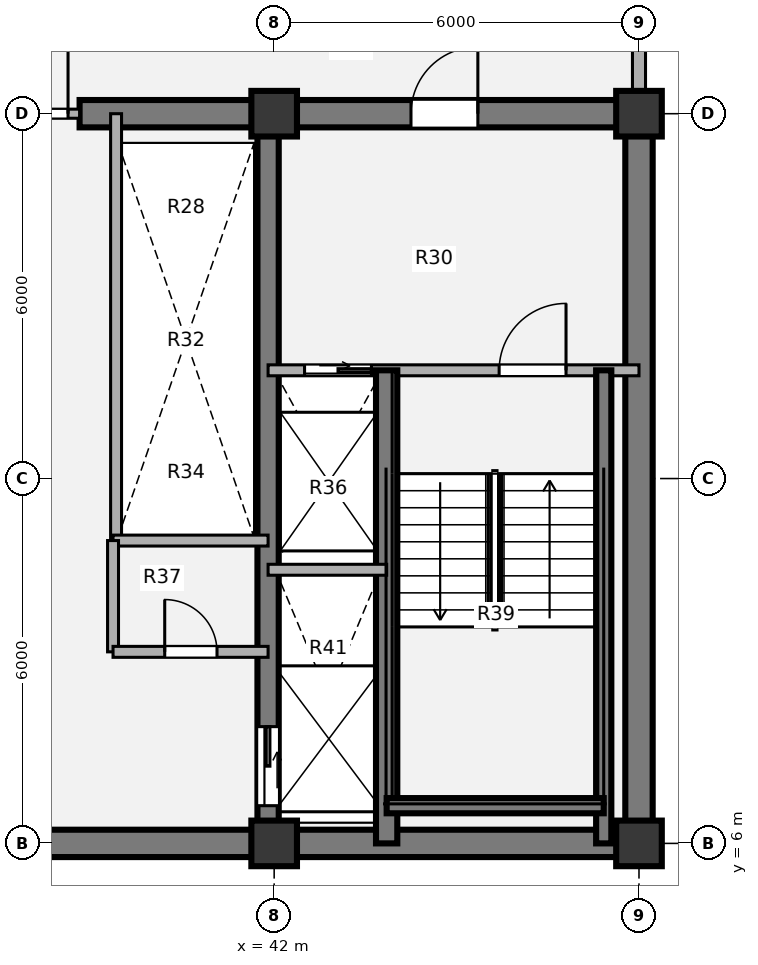
"""IFC4 building model, lengths in metres.
Left out: names, types, materials, properties, quantities, classifications, styles, units other than length and angle.
Written with IfcOpenShell. Run it as: python <this file> out.ifc"""

import sys

from ifc_helpers import new_model, si_unit, direction, frame, frame_2d, origin, origin_2d, place, context, subcontext, project, spatial, rectangle, extrude, source, transform, mapped, element, fill, save


model = new_model("IFC4")
c1 = context("Model", 3, precision=1e-05, world=origin(), true_north=direction((0.0, 1.0)))
c2 = subcontext(c1, "Body", "Model", "MODEL_VIEW")
j1 = project(units=[si_unit("LENGTHUNIT", "METRE"), si_unit("PLANEANGLEUNIT", "RADIAN")], contexts=[c1])
p1 = place(None, origin())
s1 = spatial("IfcSite", under=j1, at=p1, CompositionType="ELEMENT")
p2 = place(p1, origin())
s2 = spatial("IfcBuilding", under=s1, at=p2, CompositionType="ELEMENT")
p3 = place(p2, frame((0.0, 0.0, 171.54)))
s3 = spatial("IfcBuildingStorey", under=s2, at=p3, CompositionType="ELEMENT", Elevation=171.54)
m1 = source(origin(), c2, "Body", "SweptSolid", [
    extrude(rectangle(XDim=0.75, YDim=0.75, at=origin_2d()), origin(), (0.0, 0.0, 1.0), 3.78),
])
for number, where, z_axis, x_axis in (
    (1, (42.0, 6.0, 0.0), (0.0, 0.0, 1.0), (1.0, 0.0, 0.0)),
    (2, (48.0, 6.0, 0.0), (0.0, 0.0, 1.0), (1.0, 0.0, 0.0)),
    (3, (42.0, 18.0, 0.0), (0.0, 0.0, 1.0), (1.0, 0.0, 0.0)),
    (4, (48.0, 18.0, 0.0), (0.0, 0.0, 1.0), (1.0, 0.0, 0.0)),
):
    element("IfcColumn", number, at=place(p3, frame(where, z_axis=z_axis, x_axis=x_axis)), inside=s3, PredefinedType="COLUMN", context=c2, shape_type="MappedRepresentation", body=[
        mapped(m1, transform((0.0, 0.0, 0.0), x_axis=(1.0, 0.0, 0.0), y_axis=(0.0, 1.0, 0.0), z_axis=(0.0, 0.0, 1.0), scale=1.0)),
    ])
p4 = place(p3, frame((48.225, 6.0, 0.0), z_axis=(0.0, 0.0, 1.0), x_axis=(-1.0, 0.0, 0.0)))
e5 = element("IfcWall", 5, at=p4, inside=s3, PredefinedType="SHEAR", context=c2, shape_type="SweptSolid", body=[
    extrude(rectangle(XDim=24.45, YDim=0.45, at=frame_2d((12.225, 0.0))), origin(), (0.0, 0.0, 1.0), 3.78),
])
p5 = place(p3, frame((48.0, 18.0, 0.0), z_axis=(0.0, 0.0, 1.0), x_axis=(0.0, -1.0, 0.0)))
e6 = element("IfcWall", 6, at=p5, inside=s3, PredefinedType="SHEAR", context=c2, shape_type="SweptSolid", body=[
    extrude(rectangle(XDim=12.0, YDim=0.45, at=frame_2d((6.0, 0.0))), origin(), (0.0, 0.0, 1.0), 3.78),
])
p6 = place(p3, frame((38.8, 18.0, 0.0), z_axis=(0.0, 0.0, 1.0), x_axis=(1.0, 0.0, 0.0)))
e7 = element("IfcWall", 7, at=p6, inside=s3, PredefinedType="SHEAR", context=c2, shape_type="SweptSolid", body=[
    extrude(rectangle(XDim=9.425, YDim=0.45, at=frame_2d((4.712, 0.0))), origin(), (0.0, 0.0, 1.0), 3.78),
])
p7 = place(p6, frame((5.45, 0.0, 0.0)))
e8 = element("IfcOpeningElement", 8, at=p7, cuts=e7, PredefinedType="OPENING", context=c2, shape_type="SweptSolid", body=[
    extrude(rectangle(XDim=1.1, YDim=2.1, at=origin_2d()), frame((0.55, 0.235, 1.05), z_axis=(0.0, -1.0, 0.0), x_axis=(1.0, 0.0, 0.0)), (0.0, 0.0, 1.0), 0.47),
])
p8 = place(p3, frame((41.9, 18.0, 0.0), z_axis=(0.0, 0.0, 1.0), x_axis=(0.0, -1.0, 0.0)))
e9 = element("IfcWall", 9, at=p8, inside=s3, PredefinedType="SHEAR", context=c2, shape_type="SweptSolid", body=[
    extrude(rectangle(XDim=12.0, YDim=0.35, at=frame_2d((6.0, 0.0))), origin(), (0.0, 0.0, 1.0), 3.78),
])
p9 = place(p8, frame((10.08, 0.0, 0.0)))
e10 = element("IfcOpeningElement", 10, at=p9, cuts=e9, PredefinedType="OPENING", context=c2, shape_type="SweptSolid", body=[
    extrude(rectangle(XDim=1.3, YDim=2.1, at=origin_2d()), frame((0.65, 0.185, 1.05), z_axis=(0.0, -1.0, 0.0), x_axis=(1.0, 0.0, 0.0)), (0.0, 0.0, 1.0), 0.37),
])
p10 = place(p3, frame((48.0, 21.05, 0.0), z_axis=(0.0, 0.0, 1.0), x_axis=(0.0, -1.0, 0.0)))
e11 = element("IfcWall", 11, at=p10, inside=s3, PredefinedType="SOLIDWALL", context=c2, shape_type="SweptSolid", body=[
    extrude(rectangle(XDim=2.695, YDim=0.215, at=frame_2d((1.348, 0.0))), origin(), (0.0, 0.0, 1.0), 2.718),
])
p11 = place(p3, frame((39.4, 11.0, 0.0), z_axis=(0.0, 0.0, 1.0), x_axis=(0.0, 1.0, 0.0)))
e12 = element("IfcWall", 12, at=p11, inside=s3, PredefinedType="PARTITIONING", context=c2, shape_type="SweptSolid", body=[
    extrude(rectangle(XDim=7.0, YDim=0.18, at=frame_2d((3.5, 0.0))), origin(), (0.0, 0.0, 1.0), 3.5),
])
p12 = place(p3, frame((39.35, 10.98, 0.0), z_axis=(0.0, 0.0, 1.0), x_axis=(1.0, 0.0, 0.0)))
e13 = element("IfcWall", 13, at=p12, inside=s3, PredefinedType="PARTITIONING", context=c2, shape_type="SweptSolid", body=[
    extrude(rectangle(XDim=2.55, YDim=0.18, at=frame_2d((1.275, 0.0))), origin(), (0.0, 0.0, 1.0), 3.5),
])
p13 = place(p3, frame((39.35, 9.15, 0.0), z_axis=(0.0, 0.0, 1.0), x_axis=(0.0, 1.0, 0.0)))
e14 = element("IfcWall", 14, at=p13, inside=s3, PredefinedType="PARTITIONING", context=c2, shape_type="SweptSolid", body=[
    extrude(rectangle(XDim=1.83, YDim=0.18, at=frame_2d((0.915, 0.0))), origin(), (0.0, 0.0, 1.0), 3.5),
])
p14 = place(p3, frame((39.35, 9.15, 0.0), z_axis=(0.0, 0.0, 1.0), x_axis=(1.0, 0.0, 0.0)))
e15 = element("IfcWall", 15, at=p14, inside=s3, PredefinedType="PARTITIONING", context=c2, shape_type="SweptSolid", body=[
    extrude(rectangle(XDim=2.55, YDim=0.18, at=frame_2d((1.275, 0.0))), origin(), (0.0, 0.0, 1.0), 3.5),
])
p15 = place(p14, frame((0.85, 0.0, 0.0)))
e16 = element("IfcOpeningElement", 16, at=p15, cuts=e15, PredefinedType="OPENING", context=c2, shape_type="SweptSolid", body=[
    extrude(rectangle(XDim=0.86, YDim=2.1, at=origin_2d()), frame((0.43, 0.1, 1.05), z_axis=(0.0, -1.0, 0.0), x_axis=(1.0, 0.0, 0.0)), (0.0, 0.0, 1.0), 0.2),
])
p16 = place(p3, frame((33.2, 18.0, 0.0), z_axis=(0.0, 0.0, 1.0), x_axis=(1.0, 0.0, 0.0)))
e17 = element("IfcWall", 17, at=p16, inside=s3, PredefinedType="PARTITIONING", context=c2, shape_type="SweptSolid", body=[
    extrude(rectangle(XDim=5.6, YDim=0.15, at=frame_2d((2.8, 0.0))), origin(), (0.0, 0.0, 1.0), 2.515),
])
p17 = place(p16, frame((0.19, 0.0, 0.0)))
e18 = element("IfcOpeningElement", 18, at=p17, cuts=e17, PredefinedType="OPENING", context=c2, shape_type="SweptSolid", body=[
    extrude(rectangle(XDim=1.1, YDim=2.1, at=origin_2d()), frame((0.55, 0.085, 1.05), z_axis=(0.0, -1.0, 0.0), x_axis=(1.0, 0.0, 0.0)), (0.0, 0.0, 1.0), 0.17),
])
p18 = place(p16, frame((4.31, 0.0, 0.0)))
e19 = element("IfcOpeningElement", 19, at=p18, cuts=e17, PredefinedType="OPENING", context=c2, shape_type="SweptSolid", body=[
    extrude(rectangle(XDim=1.1, YDim=2.1, at=origin_2d()), frame((0.55, 0.085, 1.05), z_axis=(0.0, -1.0, 0.0), x_axis=(1.0, 0.0, 0.0)), (0.0, 0.0, 1.0), 0.17),
])
p19 = place(p3, frame((41.9, 13.78, 0.0), z_axis=(0.0, 0.0, 1.0), x_axis=(1.0, 0.0, 0.0)))
e20 = element("IfcWall", 20, at=p19, inside=s3, PredefinedType="PARTITIONING", context=c2, shape_type="SweptSolid", body=[
    extrude(rectangle(XDim=6.1, YDim=0.18, at=frame_2d((3.05, 0.0))), origin(), (0.0, 0.0, 1.0), 3.5),
])
p20 = place(p19, frame((0.6, 0.0, 0.0)))
e21 = element("IfcOpeningElement", 21, at=p20, cuts=e20, PredefinedType="OPENING", context=c2, shape_type="SweptSolid", body=[
    extrude(rectangle(XDim=1.1, YDim=2.1, at=origin_2d()), frame((0.55, 0.1, 1.05), z_axis=(0.0, -1.0, 0.0), x_axis=(1.0, 0.0, 0.0)), (0.0, 0.0, 1.0), 0.2),
])
p21 = place(p19, frame((3.8, 0.0, 0.0)))
e22 = element("IfcOpeningElement", 22, at=p21, cuts=e20, PredefinedType="OPENING", context=c2, shape_type="SweptSolid", body=[
    extrude(rectangle(XDim=1.1, YDim=2.1, at=origin_2d()), frame((0.55, 0.1, 1.05), z_axis=(0.0, -1.0, 0.0), x_axis=(1.0, 0.0, 0.0)), (0.0, 0.0, 1.0), 0.2),
])
p22 = place(p3, frame((43.85, 6.0, 0.0), z_axis=(0.0, 0.0, 1.0), x_axis=(0.0, 1.0, 0.0)))
e23 = element("IfcWall", 23, at=p22, inside=s3, PredefinedType="SHEAR", context=c2, shape_type="SweptSolid", body=[
    extrude(rectangle(XDim=7.78, YDim=0.35, at=frame_2d((3.89, 0.0))), origin(), (0.0, 0.0, 1.0), 3.85),
])
p23 = place(p3, frame((47.42, 6.0, 0.0), z_axis=(0.0, 0.0, 1.0), x_axis=(0.0, 1.0, 0.0)))
e24 = element("IfcWall", 24, at=p23, inside=s3, PredefinedType="SHEAR", context=c2, shape_type="SweptSolid", body=[
    extrude(rectangle(XDim=7.78, YDim=0.25, at=frame_2d((3.89, 0.0))), origin(), (0.0, 0.0, 1.0), 3.85),
])
p24 = place(p3, frame((43.85, 6.62, 0.0), z_axis=(0.0, 0.0, 1.0), x_axis=(1.0, 0.0, 0.0)))
e25 = element("IfcWall", 25, at=p24, inside=s3, PredefinedType="SHEAR", context=c2, shape_type="SweptSolid", body=[
    extrude(rectangle(XDim=3.57, YDim=0.25, at=frame_2d((1.785, 0.0))), origin(), (0.0, 0.0, 1.0), 3.85),
])
p25 = place(p3, frame((41.9, 10.5, 0.0), z_axis=(0.0, 0.0, 1.0), x_axis=(1.0, 0.0, 0.0)))
e26 = element("IfcWall", 26, at=p25, inside=s3, PredefinedType="PARTITIONING", context=c2, shape_type="SweptSolid", body=[
    extrude(rectangle(XDim=1.95, YDim=0.18, at=frame_2d((0.975, 0.0))), origin(), (0.0, 0.0, 1.0), 3.5),
])
m2 = source(origin(), c2, "Body", "SweptSolid", [
    extrude(rectangle(XDim=0.86, YDim=2.1, at=origin_2d()), frame((0.43, 0.025, 1.05), z_axis=(0.0, -1.0, 0.0), x_axis=(1.0, 0.0, 0.0)), (0.0, 0.0, 1.0), 0.05),
])
p26 = place(p15, origin())
e27 = element("IfcDoor", 27, at=p26, inside=s3, OperationType="SINGLE_SWING_LEFT", PredefinedType="DOOR", context=c2, shape_type="MappedRepresentation", body=[
    mapped(m2, transform((0.0, 0.0, 0.0), x_axis=(1.0, 0.0, 0.0), y_axis=(0.0, 1.0, 0.0), z_axis=(0.0, 0.0, 1.0), scale=1.0)),
])
fill(e16, e27)
m3 = source(origin(), c2, "Body", "SweptSolid", [
    extrude(rectangle(XDim=1.1, YDim=2.1, at=origin_2d()), frame((0.55, 0.025, 1.05), z_axis=(0.0, -1.0, 0.0), x_axis=(1.0, 0.0, 0.0)), (0.0, 0.0, 1.0), 0.05),
])
p27 = place(p18, origin())
e28 = element("IfcDoor", 28, at=p27, inside=s3, OperationType="SINGLE_SWING_RIGHT", PredefinedType="DOOR", context=c2, shape_type="MappedRepresentation", body=[
    mapped(m3, transform((0.0, 0.0, 0.0), x_axis=(1.0, 0.0, 0.0), y_axis=(0.0, 1.0, 0.0), z_axis=(0.0, 0.0, 1.0), scale=1.0)),
])
fill(e19, e28)
m4 = source(origin(), c2, "Body", "SweptSolid", [
    extrude(rectangle(XDim=1.1, YDim=2.1, at=origin_2d()), frame((0.55, 0.025, 1.05), z_axis=(0.0, -1.0, 0.0), x_axis=(1.0, 0.0, 0.0)), (0.0, 0.0, 1.0), 0.05),
])
p28 = place(p20, origin())
e29 = element("IfcDoor", 29, at=p28, inside=s3, OperationType="SLIDING_TO_RIGHT", PredefinedType="DOOR", context=c2, shape_type="MappedRepresentation", body=[
    mapped(m4, transform((0.0, 0.0, 0.0), x_axis=(1.0, 0.0, 0.0), y_axis=(0.0, 1.0, 0.0), z_axis=(0.0, 0.0, 1.0), scale=1.0)),
])
fill(e21, e29)
m5 = source(origin(), c2, "Body", "SweptSolid", [
    extrude(rectangle(XDim=1.1, YDim=2.1, at=origin_2d()), frame((0.55, 0.025, 1.05), z_axis=(0.0, -1.0, 0.0), x_axis=(1.0, 0.0, 0.0)), (0.0, 0.0, 1.0), 0.05),
])
p29 = place(p21, origin())
e30 = element("IfcDoor", 30, at=p29, inside=s3, OperationType="SINGLE_SWING_RIGHT", PredefinedType="DOOR", context=c2, shape_type="MappedRepresentation", body=[
    mapped(m5, transform((0.0, 0.0, 0.0), x_axis=(1.0, 0.0, 0.0), y_axis=(0.0, 1.0, 0.0), z_axis=(0.0, 0.0, 1.0), scale=1.0)),
])
fill(e22, e30)
m6 = source(origin(), c2, "Body", "SweptSolid", [
    extrude(rectangle(XDim=1.3, YDim=2.1, at=origin_2d()), frame((0.65, 0.025, 1.05), z_axis=(0.0, -1.0, 0.0), x_axis=(1.0, 0.0, 0.0)), (0.0, 0.0, 1.0), 0.05),
])
p30 = place(p9, origin())
e31 = element("IfcDoor", 31, at=p30, inside=s3, OperationType="SLIDING_TO_LEFT", PredefinedType="DOOR", context=c2, shape_type="MappedRepresentation", body=[
    mapped(m6, transform((0.0, 0.0, 0.0), x_axis=(1.0, 0.0, 0.0), y_axis=(0.0, 1.0, 0.0), z_axis=(0.0, 0.0, 1.0), scale=1.0)),
])
fill(e10, e31)
p31 = place(p7, origin())
e32 = element("IfcDoor", 32, at=p31, inside=s3, OperationType="SINGLE_SWING_RIGHT", PredefinedType="DOOR", context=c2, shape_type="MappedRepresentation", body=[
    mapped(m3, transform((0.0, 0.0, 0.0), x_axis=(1.0, 0.0, 0.0), y_axis=(0.0, 1.0, 0.0), z_axis=(0.0, 0.0, 1.0), scale=1.0)),
])
fill(e8, e32)
save(model, sys.argv[1])
